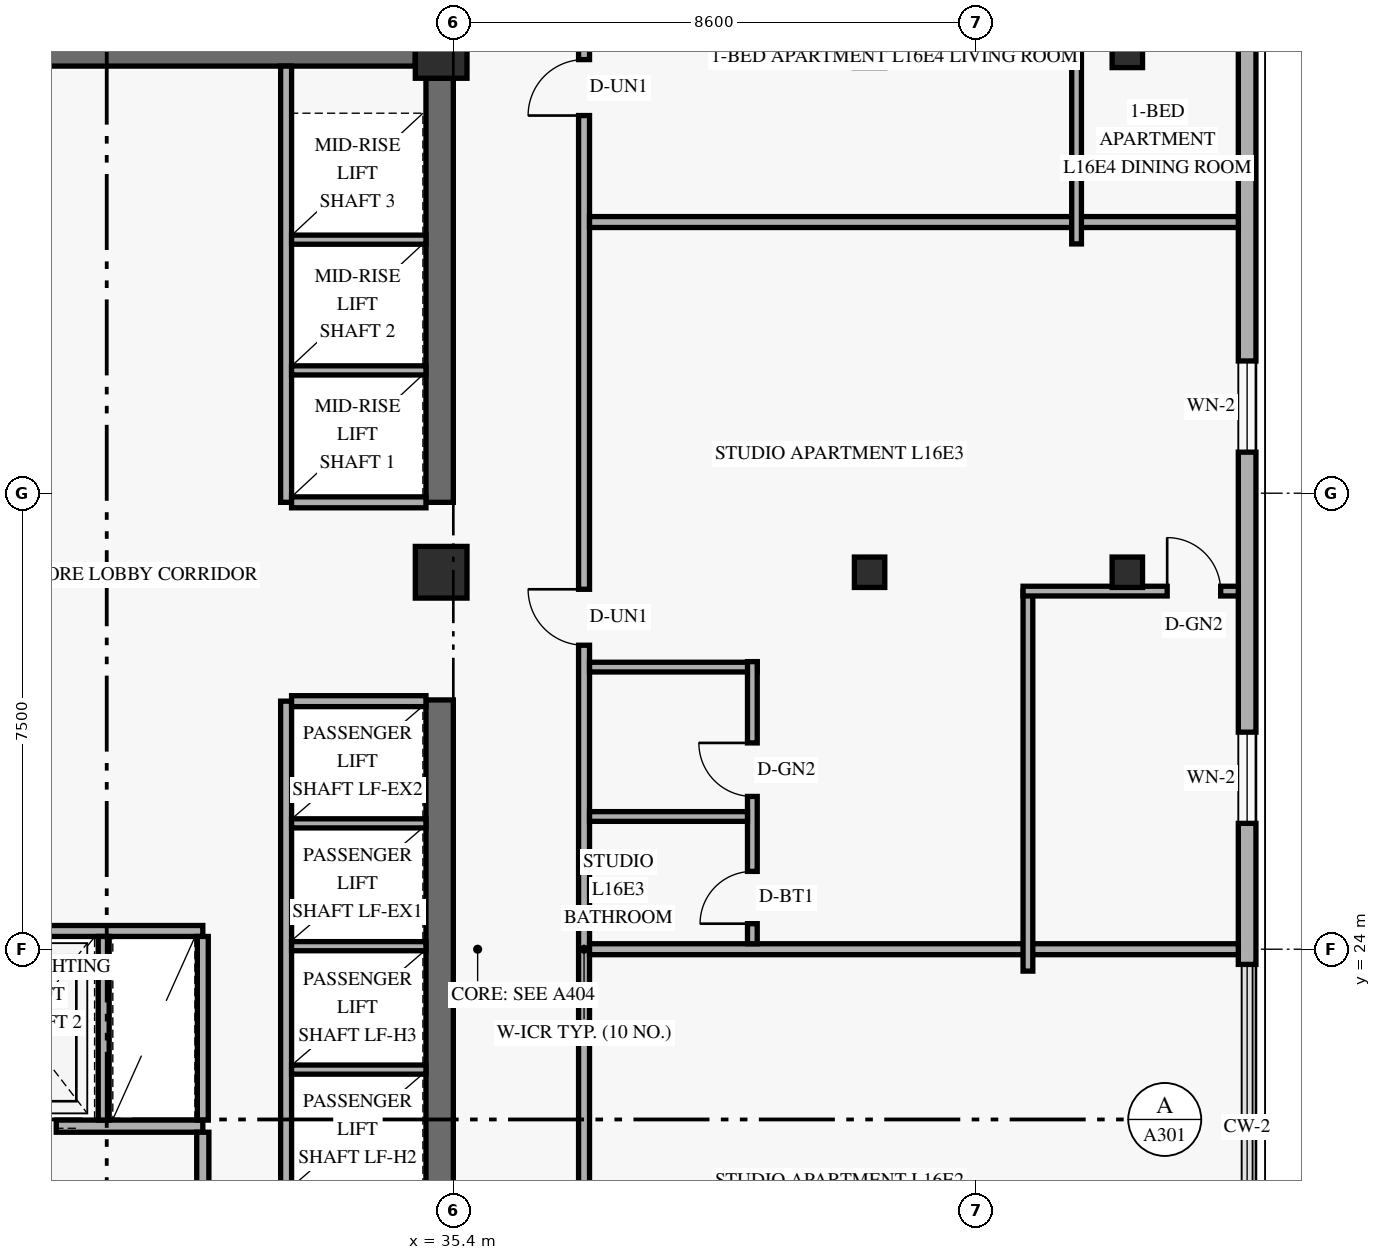
"""IFC4 building model, lengths in metres.
Left out: names, types, materials, properties, quantities, classifications, styles, units other than length and angle.
Written with IfcOpenShell. Run it as: python <this file> out.ifc"""

import sys

from ifc_helpers import new_model, si_unit, direction, frame, frame_2d, origin, origin_2d, place, context, subcontext, project, spatial, rectangle, hollow_rectangle, extrude, element, fill, save


model = new_model("IFC4")
c1 = context("Model", 3, precision=1e-05, world=origin(), true_north=direction((0.0, 1.0)))
c2 = subcontext(c1, "Body", "Model", "MODEL_VIEW")
j1 = project(units=[si_unit("LENGTHUNIT", "METRE"), si_unit("PLANEANGLEUNIT", "RADIAN")], contexts=[c1])
p1 = place(None, origin())
s1 = spatial("IfcSite", under=j1, at=p1, CompositionType="ELEMENT")
p2 = place(p1, origin())
s2 = spatial("IfcBuilding", under=s1, at=p2, CompositionType="ELEMENT")
p3 = place(p2, frame((0.0, 0.0, 64.2)))
s3 = spatial("IfcBuildingStorey", under=s2, at=p3, CompositionType="ELEMENT", Elevation=64.2)
p4 = place(p3, frame((35.175, 17.975, 0.0), z_axis=(0.0, 0.0, 1.0), x_axis=(0.0, 1.0, 0.0)))
e1 = element("IfcWall", 1, at=p4, inside=s3, PredefinedType="SHEAR", context=c2, shape_type="SweptSolid", body=[
    extrude(rectangle(XDim=10.125, YDim=0.45, at=frame_2d((5.062, 0.0))), origin(), (0.0, 0.0, 1.0), 2.667),
])
p5 = place(p3, frame((35.175, 31.35, 0.0), z_axis=(0.0, 0.0, 1.0), x_axis=(0.0, 1.0, 0.0)))
e2 = element("IfcWall", 2, at=p5, inside=s3, PredefinedType="SHEAR", context=c2, shape_type="SweptSolid", body=[
    extrude(rectangle(XDim=6.975, YDim=0.45, at=frame_2d((3.487, 0.0))), origin(), (0.0, 0.0, 1.0), 2.667),
])
p6 = place(p3, frame((24.625, 38.75, 0.0), z_axis=(0.0, 0.0, 1.0), x_axis=(1.0, 0.0, 0.0)))
e3 = element("IfcWall", 3, at=p6, inside=s3, PredefinedType="SHEAR", context=c2, shape_type="SweptSolid", body=[
    extrude(rectangle(XDim=10.15, YDim=0.45, at=frame_2d((5.075, 0.0))), origin(), (0.0, 0.0, 1.0), 3.36),
])
for number, where, z_axis, x_axis in (
    (4, (35.2, 30.2, 0.0), (0.0, 0.0, 1.0), (1.0, 0.0, 0.0)),
    (5, (35.2, 38.75, 0.0), (0.0, 0.0, 1.0), (1.0, 0.0, 0.0)),
):
    element("IfcColumn", number, at=place(p3, frame(where, z_axis=z_axis, x_axis=x_axis)), inside=s3, PredefinedType="COLUMN", context=c2, shape_type="SweptSolid", body=[
        extrude(rectangle(XDim=0.85, YDim=0.85, at=origin_2d()), origin(), (0.0, 0.0, 1.0), 3.6),
    ])
for number, where, z_axis, x_axis in (
    (6, (42.183, 30.2, 0.0), (0.035, 0.0, 0.999), (0.0, 1.0, 0.0)),
    (7, (42.183, 38.75, 0.0), (0.035, 0.0, 0.999), (0.0, 1.0, 0.0)),
):
    element("IfcColumn", number, at=place(p3, frame(where, z_axis=z_axis, x_axis=x_axis)), inside=s3, PredefinedType="COLUMN", context=c2, shape_type="SweptSolid", body=[
        extrude(hollow_rectangle(XDim=0.5, YDim=0.5, WallThickness=0.022, at=origin_2d()), origin(), (0.0, 0.0, 1.0), 3.602),
    ])
for number, where, z_axis, x_axis in (
    (8, (46.38, 30.2, 0.0), (0.058, 0.0, 0.998), (0.0, 1.0, 0.0)),
    (9, (46.38, 38.75, 0.0), (0.058, 0.0, 0.998), (0.0, 1.0, 0.0)),
):
    element("IfcColumn", number, at=place(p3, frame(where, z_axis=z_axis, x_axis=x_axis)), inside=s3, PredefinedType="COLUMN", context=c2, shape_type="SweptSolid", body=[
        extrude(hollow_rectangle(XDim=0.5, YDim=0.5, WallThickness=0.022, at=origin_2d()), origin(), (0.0, 0.0, 1.0), 3.606),
    ])
p7 = place(p3, frame((48.455, 23.75, 0.0), z_axis=(0.0, 0.0, 1.0), x_axis=(0.0, 1.0, 0.0)))
e10 = element("IfcWall", 10, at=p7, inside=s3, PredefinedType="SOLIDWALL", context=c2, shape_type="SweptSolid", body=[
    extrude(rectangle(XDim=19.63, YDim=0.29, at=frame_2d((9.815, 0.0))), origin(), (0.0, 0.0, 1.0), 3.36),
])
p8 = place(p7, frame((2.32, 0.0, 0.85)))
e11 = element("IfcOpeningElement", 11, at=p8, cuts=e10, PredefinedType="OPENING", context=c2, shape_type="SweptSolid", body=[
    extrude(rectangle(XDim=1.5, YDim=1.55, at=frame_2d((0.75, 0.775))), frame((0.0, 0.155, 0.0), z_axis=(0.0, -1.0, 0.0), x_axis=(1.0, 0.0, 0.0)), (0.0, 0.0, 1.0), 0.31),
])
p9 = place(p7, frame((8.425, 0.0, 0.85)))
e12 = element("IfcOpeningElement", 12, at=p9, cuts=e10, PredefinedType="OPENING", context=c2, shape_type="SweptSolid", body=[
    extrude(rectangle(XDim=1.5, YDim=1.55, at=frame_2d((0.75, 0.775))), frame((0.0, 0.155, 0.0), z_axis=(0.0, -1.0, 0.0), x_axis=(1.0, 0.0, 0.0)), (0.0, 0.0, 1.0), 0.31),
])
p10 = place(p7, frame((15.17, 0.0, 0.85)))
e13 = element("IfcOpeningElement", 13, at=p10, cuts=e10, PredefinedType="OPENING", context=c2, shape_type="SweptSolid", body=[
    extrude(rectangle(XDim=1.5, YDim=1.55, at=frame_2d((0.75, 0.775))), frame((0.0, 0.155, 0.0), z_axis=(0.0, -1.0, 0.0), x_axis=(1.0, 0.0, 0.0)), (0.0, 0.0, 1.0), 0.31),
])
p11 = place(p3, frame((24.45, 21.09, 0.0), z_axis=(0.0, 0.0, 1.0), x_axis=(1.0, 0.0, 0.0)))
e14 = element("IfcWall", 14, at=p11, inside=s3, PredefinedType="STANDARD", context=c2, shape_type="SweptSolid", body=[
    extrude(rectangle(XDim=6.83, YDim=0.2, at=frame_2d((3.415, 0.0))), origin(), (0.0, 0.0, 1.0), 3.36),
])
p12 = place(p11, frame((0.72, 0.0, 0.0)))
e15 = element("IfcOpeningElement", 15, at=p12, cuts=e14, PredefinedType="OPENING", context=c2, shape_type="SweptSolid", body=[
    extrude(rectangle(XDim=1.1, YDim=2.2, at=frame_2d((0.55, 1.1))), frame((0.0, 0.11, 0.0), z_axis=(0.0, -1.0, 0.0), x_axis=(1.0, 0.0, 0.0)), (0.0, 0.0, 1.0), 0.22),
])
p13 = place(p11, frame((3.32, 0.0, 0.0)))
e16 = element("IfcOpeningElement", 16, at=p13, cuts=e14, PredefinedType="OPENING", context=c2, shape_type="SweptSolid", body=[
    extrude(rectangle(XDim=1.1, YDim=2.2, at=frame_2d((0.55, 1.1))), frame((0.0, 0.11, 0.0), z_axis=(0.0, -1.0, 0.0), x_axis=(1.0, 0.0, 0.0)), (0.0, 0.0, 1.0), 0.22),
])
p14 = place(p3, frame((31.28, 17.07, 0.0), z_axis=(0.0, 0.0, 1.0), x_axis=(0.0, 1.0, 0.0)))
e17 = element("IfcWall", 17, at=p14, inside=s3, PredefinedType="STANDARD", context=c2, shape_type="SweptSolid", body=[
    extrude(rectangle(XDim=3.92, YDim=0.2, at=frame_2d((1.96, 0.0))), origin(), (0.0, 0.0, 1.0), 2.649),
])
p15 = place(p14, frame((1.35, 0.0, 0.0)))
e18 = element("IfcOpeningElement", 18, at=p15, cuts=e17, PredefinedType="OPENING", context=c2, shape_type="SweptSolid", body=[
    extrude(rectangle(XDim=1.2, YDim=2.15, at=frame_2d((0.6, 1.075))), frame((0.0, 0.11, 0.0), z_axis=(0.0, -1.0, 0.0), x_axis=(1.0, 0.0, 0.0)), (0.0, 0.0, 1.0), 0.22),
])
p16 = place(p3, frame((24.45, 24.3, 0.0), z_axis=(0.0, 0.0, 1.0), x_axis=(1.0, 0.0, 0.0)))
e19 = element("IfcWall", 19, at=p16, inside=s3, PredefinedType="STANDARD", context=c2, shape_type="SweptSolid", body=[
    extrude(rectangle(XDim=6.83, YDim=0.18, at=frame_2d((3.415, 0.0))), origin(), (0.0, 0.0, 1.0), 3.36),
])
for number, where, z_axis, x_axis in (
    (20, (29.65, 21.19, 0.0), (0.0, 0.0, 1.0), (0.0, 1.0, 0.0)),
    (21, (31.28, 21.19, 0.0), (0.0, 0.0, 1.0), (0.0, 1.0, 0.0)),
):
    element("IfcWall", number, at=place(p3, frame(where, z_axis=z_axis, x_axis=x_axis)), inside=s3, PredefinedType="STANDARD", context=c2, shape_type="SweptSolid", body=[
        extrude(rectangle(XDim=3.02, YDim=0.18, at=frame_2d((1.51, 0.0))), origin(), (0.0, 0.0, 1.0), 3.36),
    ])
p17 = place(p3, frame((32.65, 18.02, 0.0), z_axis=(0.0, 0.0, 1.0), x_axis=(0.0, 1.0, 0.0)))
e22 = element("IfcWall", 22, at=p17, inside=s3, PredefinedType="STANDARD", context=c2, shape_type="SweptSolid", body=[
    extrude(rectangle(XDim=10.06, YDim=0.18, at=frame_2d((5.03, 0.0))), origin(), (0.0, 0.0, 1.0), 3.36),
])
p18 = place(p3, frame((32.74, 28.08, 0.0), z_axis=(0.0, 0.0, 1.0), x_axis=(1.0, 0.0, 0.0)))
e23 = element("IfcWall", 23, at=p18, inside=s3, PredefinedType="STANDARD", context=c2, shape_type="SweptSolid", body=[
    extrude(rectangle(XDim=2.21, YDim=0.18, at=frame_2d((1.105, 0.0))), origin(), (0.0, 0.0, 1.0), 3.36),
])
for number, where, z_axis, x_axis in (
    (24, (32.74, 22.02, 0.0), (0.0, 0.0, 1.0), (1.0, 0.0, 0.0)),
    (25, (32.74, 24.05, 0.0), (0.0, 0.0, 1.0), (1.0, 0.0, 0.0)),
    (26, (32.74, 26.07, 0.0), (0.0, 0.0, 1.0), (1.0, 0.0, 0.0)),
):
    element("IfcWall", number, at=place(p3, frame(where, z_axis=z_axis, x_axis=x_axis)), inside=s3, PredefinedType="STANDARD", context=c2, shape_type="SweptSolid", body=[
        extrude(rectangle(XDim=2.21, YDim=0.15, at=frame_2d((1.105, 0.0))), origin(), (0.0, 0.0, 1.0), 3.36),
    ])
p19 = place(p3, frame((32.65, 31.35, 0.0), z_axis=(0.0, 0.0, 1.0), x_axis=(0.0, 1.0, 0.0)))
e27 = element("IfcWall", 27, at=p19, inside=s3, PredefinedType="STANDARD", context=c2, shape_type="SweptSolid", body=[
    extrude(rectangle(XDim=7.175, YDim=0.18, at=frame_2d((3.587, 0.0))), origin(), (0.0, 0.0, 1.0), 3.36),
])
p20 = place(p3, frame((32.74, 31.35, 0.0), z_axis=(0.0, 0.0, 1.0), x_axis=(1.0, 0.0, 0.0)))
e28 = element("IfcWall", 28, at=p20, inside=s3, PredefinedType="STANDARD", context=c2, shape_type="SweptSolid", body=[
    extrude(rectangle(XDim=2.21, YDim=0.18, at=frame_2d((1.105, 0.0))), origin(), (0.0, 0.0, 1.0), 3.36),
])
for number, where, z_axis, x_axis in (
    (29, (32.74, 33.52, 0.0), (0.0, 0.0, 1.0), (1.0, 0.0, 0.0)),
    (30, (32.74, 35.67, 0.0), (0.0, 0.0, 1.0), (1.0, 0.0, 0.0)),
):
    element("IfcWall", number, at=place(p3, frame(where, z_axis=z_axis, x_axis=x_axis)), inside=s3, PredefinedType="STANDARD", context=c2, shape_type="SweptSolid", body=[
        extrude(rectangle(XDim=2.21, YDim=0.15, at=frame_2d((1.105, 0.0))), origin(), (0.0, 0.0, 1.0), 3.36),
    ])
p21 = place(p3, frame((37.55, 1.29, 0.0), z_axis=(0.0, 0.0, 1.0), x_axis=(0.0, 1.0, 0.0)))
e31 = element("IfcWall", 31, at=p21, inside=s3, PredefinedType="STANDARD", context=c2, shape_type="SweptSolid", body=[
    extrude(rectangle(XDim=45.42, YDim=0.18, at=frame_2d((22.71, 0.0))), origin(), (0.0, 0.0, 1.0), 2.649),
])
p22 = place(p21, frame((4.81, 0.0, 0.0)))
e32 = element("IfcOpeningElement", 32, at=p22, cuts=e31, PredefinedType="OPENING", context=c2, shape_type="SweptSolid", body=[
    extrude(rectangle(XDim=0.92, YDim=2.15, at=frame_2d((0.46, 1.075))), frame((0.0, 0.1, 0.0), z_axis=(0.0, -1.0, 0.0), x_axis=(1.0, 0.0, 0.0)), (0.0, 0.0, 1.0), 0.2),
])
p23 = place(p21, frame((15.75, 0.0, 0.0)))
e33 = element("IfcOpeningElement", 33, at=p23, cuts=e31, PredefinedType="OPENING", context=c2, shape_type="SweptSolid", body=[
    extrude(rectangle(XDim=0.92, YDim=2.15, at=frame_2d((0.46, 1.075))), frame((0.0, 0.1, 0.0), z_axis=(0.0, -1.0, 0.0), x_axis=(1.0, 0.0, 0.0)), (0.0, 0.0, 1.0), 0.2),
])
p24 = place(p21, frame((27.71, 0.0, 0.0)))
e34 = element("IfcOpeningElement", 34, at=p24, cuts=e31, PredefinedType="OPENING", context=c2, shape_type="SweptSolid", body=[
    extrude(rectangle(XDim=0.92, YDim=2.15, at=frame_2d((0.46, 1.075))), frame((0.0, 0.1, 0.0), z_axis=(0.0, -1.0, 0.0), x_axis=(1.0, 0.0, 0.0)), (0.0, 0.0, 1.0), 0.2),
])
p25 = place(p21, frame((36.422, 0.0, 0.0)))
e35 = element("IfcOpeningElement", 35, at=p25, cuts=e31, PredefinedType="OPENING", context=c2, shape_type="SweptSolid", body=[
    extrude(rectangle(XDim=0.92, YDim=2.15, at=frame_2d((0.46, 1.075))), frame((0.0, 0.1, 0.0), z_axis=(0.0, -1.0, 0.0), x_axis=(1.0, 0.0, 0.0)), (0.0, 0.0, 1.0), 0.2),
])
p26 = place(p3, frame((35.42, 38.75, 0.0), z_axis=(0.0, 0.0, 1.0), x_axis=(0.0, 1.0, 0.0)))
e36 = element("IfcWall", 36, at=p26, inside=s3, PredefinedType="STANDARD", context=c2, shape_type="SweptSolid", body=[
    extrude(rectangle(XDim=0.51, YDim=0.18, at=frame_2d((0.255, 0.0))), origin(), (0.0, 0.0, 1.0), 3.36),
])
p27 = place(p3, frame((37.64, 24.0, 0.0), z_axis=(0.0, 0.0, 1.0), x_axis=(1.0, 0.0, 0.0)))
e37 = element("IfcWall", 37, at=p27, inside=s3, PredefinedType="PARTITIONING", context=c2, shape_type="SweptSolid", body=[
    extrude(rectangle(XDim=10.67, YDim=0.18, at=frame_2d((5.335, 0.0))), origin(), (0.0, 0.0, 1.0), 2.649),
])
p28 = place(p3, frame((37.64, 28.64, 0.0), z_axis=(0.0, 0.0, 1.0), x_axis=(1.0, 0.0, 0.0)))
e38 = element("IfcWall", 38, at=p28, inside=s3, PredefinedType="PLUMBINGWALL", context=c2, shape_type="SweptSolid", body=[
    extrude(rectangle(XDim=2.758, YDim=0.16, at=frame_2d((1.379, 0.0))), origin(), (0.0, 0.0, 1.0), 3.36),
])
p29 = place(p3, frame((40.318, 24.09, 0.0), z_axis=(0.0, 0.0, 1.0), x_axis=(0.0, 1.0, 0.0)))
e39 = element("IfcWall", 39, at=p29, inside=s3, PredefinedType="PLUMBINGWALL", context=c2, shape_type="SweptSolid", body=[
    extrude(rectangle(XDim=4.64, YDim=0.16, at=frame_2d((2.32, 0.0))), origin(), (0.0, 0.0, 1.0), 2.932),
])
p30 = place(p29, frame((0.33, 0.0, 0.0)))
e40 = element("IfcOpeningElement", 40, at=p30, cuts=e39, PredefinedType="OPENING", context=c2, shape_type="SweptSolid", body=[
    extrude(rectangle(XDim=0.86, YDim=2.12, at=frame_2d((0.43, 1.06))), frame((0.0, 0.09, 0.0), z_axis=(0.0, -1.0, 0.0), x_axis=(1.0, 0.0, 0.0)), (0.0, 0.0, 1.0), 0.18),
])
p31 = place(p29, frame((2.423, 0.0, 0.0)))
e41 = element("IfcOpeningElement", 41, at=p31, cuts=e39, PredefinedType="OPENING", context=c2, shape_type="SweptSolid", body=[
    extrude(rectangle(XDim=0.88, YDim=2.12, at=frame_2d((0.44, 1.06))), frame((0.0, 0.09, 0.0), z_axis=(0.0, -1.0, 0.0), x_axis=(1.0, 0.0, 0.0)), (0.0, 0.0, 1.0), 0.18),
])
p32 = place(p3, frame((37.64, 26.183, 0.0), z_axis=(0.0, 0.0, 1.0), x_axis=(1.0, 0.0, 0.0)))
e42 = element("IfcWall", 42, at=p32, inside=s3, PredefinedType="PLUMBINGWALL", context=c2, shape_type="SweptSolid", body=[
    extrude(rectangle(XDim=2.598, YDim=0.16, at=frame_2d((1.299, 0.0))), origin(), (0.0, 0.0, 1.0), 3.36),
])
p33 = place(p3, frame((44.85, 23.64, 0.0), z_axis=(0.0, 0.0, 1.0), x_axis=(0.0, 1.0, 0.0)))
e43 = element("IfcWall", 43, at=p33, inside=s3, PredefinedType="PARTITIONING", context=c2, shape_type="SweptSolid", body=[
    extrude(rectangle(XDim=6.25, YDim=0.16, at=frame_2d((3.125, 0.0))), origin(), (0.0, 0.0, 1.0), 2.932),
])
p34 = place(p3, frame((44.77, 29.89, 0.0), z_axis=(0.0, 0.0, 1.0), x_axis=(1.0, 0.0, 0.0)))
e44 = element("IfcWall", 44, at=p34, inside=s3, PredefinedType="PARTITIONING", context=c2, shape_type="SweptSolid", body=[
    extrude(rectangle(XDim=3.54, YDim=0.16, at=frame_2d((1.77, 0.0))), origin(), (0.0, 0.0, 1.0), 2.809),
])
p35 = place(p34, frame((2.37, 0.0, 0.0)))
e45 = element("IfcOpeningElement", 45, at=p35, cuts=e44, PredefinedType="OPENING", context=c2, shape_type="SweptSolid", body=[
    extrude(rectangle(XDim=0.88, YDim=2.12, at=frame_2d((0.44, 1.06))), frame((0.0, 0.09, 0.0), z_axis=(0.0, -1.0, 0.0), x_axis=(1.0, 0.0, 0.0)), (0.0, 0.0, 1.0), 0.18),
])
p36 = place(p3, frame((37.64, 35.96, 0.0), z_axis=(0.0, 0.0, 1.0), x_axis=(1.0, 0.0, 0.0)))
e46 = element("IfcWall", 46, at=p36, inside=s3, PredefinedType="PARTITIONING", context=c2, shape_type="SweptSolid", body=[
    extrude(rectangle(XDim=10.67, YDim=0.18, at=frame_2d((5.335, 0.0))), origin(), (0.0, 0.0, 1.0), 2.649),
])
p37 = place(p3, frame((45.65, 35.6, 0.0), z_axis=(0.0, 0.0, 1.0), x_axis=(0.0, 1.0, 0.0)))
e47 = element("IfcWall", 47, at=p37, inside=s3, PredefinedType="PARTITIONING", context=c2, shape_type="SweptSolid", body=[
    extrude(rectangle(XDim=8.256, YDim=0.16, at=frame_2d((4.128, 0.0))), origin(), (0.0, 0.0, 1.0), 2.649),
])
p38 = place(p37, frame((3.788, 0.0, 0.0)))
e48 = element("IfcOpeningElement", 48, at=p38, cuts=e47, PredefinedType="OPENING", context=c2, shape_type="SweptSolid", body=[
    extrude(rectangle(XDim=0.95, YDim=2.15, at=frame_2d((0.475, 1.075))), frame((0.0, 0.09, 0.0), z_axis=(0.0, -1.0, 0.0), x_axis=(1.0, 0.0, 0.0)), (0.0, 0.0, 1.0), 0.18),
])
p39 = place(p8, origin())
e49 = element("IfcWindow", 49, at=p39, inside=s3, PartitioningType="SINGLE_PANEL", PredefinedType="WINDOW", context=c2, shape_type="SweptSolid", body=[
    extrude(rectangle(XDim=1.5, YDim=1.55, at=frame_2d((0.75, 0.775))), frame((0.0, 0.03, 0.0), z_axis=(0.0, -1.0, 0.0), x_axis=(1.0, 0.0, 0.0)), (0.0, 0.0, 1.0), 0.06),
])
fill(e11, e49)
p40 = place(p9, origin())
e50 = element("IfcWindow", 50, at=p40, inside=s3, PartitioningType="SINGLE_PANEL", PredefinedType="WINDOW", context=c2, shape_type="SweptSolid", body=[
    extrude(rectangle(XDim=1.5, YDim=1.55, at=frame_2d((0.75, 0.775))), frame((0.0, 0.03, 0.0), z_axis=(0.0, -1.0, 0.0), x_axis=(1.0, 0.0, 0.0)), (0.0, 0.0, 1.0), 0.06),
])
fill(e12, e50)
p41 = place(p13, origin())
e51 = element("IfcDoor", 51, at=p41, inside=s3, OperationType="SLIDING_TO_LEFT", PredefinedType="DOOR", context=c2, shape_type="SweptSolid", body=[
    extrude(rectangle(XDim=1.1, YDim=2.2, at=frame_2d((0.55, 1.1))), frame((0.0, 0.025, 0.0), z_axis=(0.0, -1.0, 0.0), x_axis=(1.0, 0.0, 0.0)), (0.0, 0.0, 1.0), 0.05),
])
fill(e16, e51)
p42 = place(p35, origin())
e52 = element("IfcDoor", 52, at=p42, inside=s3, OperationType="SINGLE_SWING_LEFT", PredefinedType="DOOR", context=c2, shape_type="SweptSolid", body=[
    extrude(rectangle(XDim=0.88, YDim=2.12, at=frame_2d((0.44, 1.06))), frame((0.0, 0.025, 0.0), z_axis=(0.0, -1.0, 0.0), x_axis=(1.0, 0.0, 0.0)), (0.0, 0.0, 1.0), 0.05),
])
fill(e45, e52)
p43 = place(p24, origin())
e53 = element("IfcDoor", 53, at=p43, inside=s3, OperationType="SINGLE_SWING_RIGHT", PredefinedType="DOOR", context=c2, shape_type="SweptSolid", body=[
    extrude(rectangle(XDim=0.92, YDim=2.15, at=frame_2d((0.46, 1.075))), frame((0.0, 0.025, 0.0), z_axis=(0.0, -1.0, 0.0), x_axis=(1.0, 0.0, 0.0)), (0.0, 0.0, 1.0), 0.05),
])
fill(e34, e53)
p44 = place(p30, origin())
e54 = element("IfcDoor", 54, at=p44, inside=s3, OperationType="SINGLE_SWING_LEFT", PredefinedType="DOOR", context=c2, shape_type="SweptSolid", body=[
    extrude(rectangle(XDim=0.86, YDim=2.12, at=frame_2d((0.43, 1.06))), frame((0.0, 0.025, 0.0), z_axis=(0.0, -1.0, 0.0), x_axis=(1.0, 0.0, 0.0)), (0.0, 0.0, 1.0), 0.05),
])
fill(e40, e54)
p45 = place(p31, origin())
e55 = element("IfcDoor", 55, at=p45, inside=s3, OperationType="SINGLE_SWING_RIGHT", PredefinedType="DOOR", context=c2, shape_type="SweptSolid", body=[
    extrude(rectangle(XDim=0.88, YDim=2.12, at=frame_2d((0.44, 1.06))), frame((0.0, 0.025, 0.0), z_axis=(0.0, -1.0, 0.0), x_axis=(1.0, 0.0, 0.0)), (0.0, 0.0, 1.0), 0.05),
])
fill(e41, e55)
p46 = place(p25, origin())
e56 = element("IfcDoor", 56, at=p46, inside=s3, OperationType="SINGLE_SWING_LEFT", PredefinedType="DOOR", context=c2, shape_type="SweptSolid", body=[
    extrude(rectangle(XDim=0.92, YDim=2.15, at=frame_2d((0.46, 1.075))), frame((0.0, 0.025, 0.0), z_axis=(0.0, -1.0, 0.0), x_axis=(1.0, 0.0, 0.0)), (0.0, 0.0, 1.0), 0.05),
])
fill(e35, e56)
save(model, sys.argv[1])
